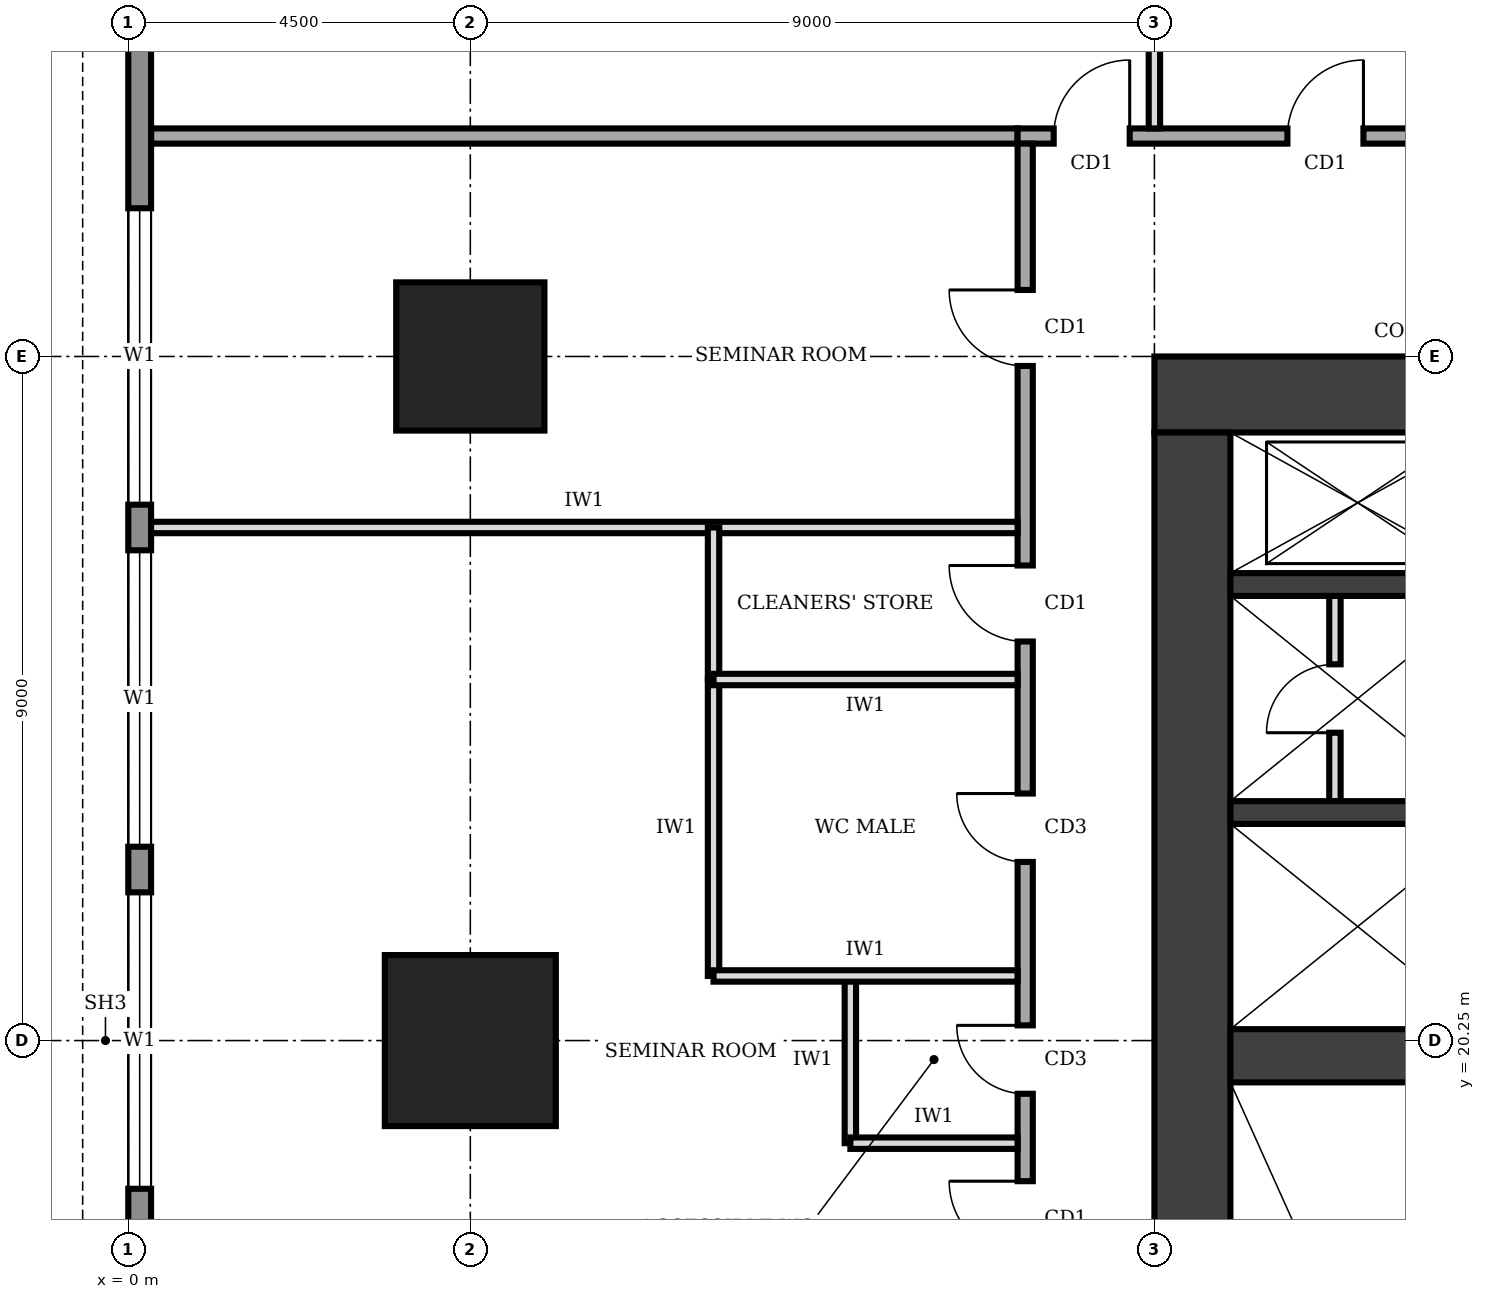
"""IFC4 building model, lengths in metres.
Left out: names, types, materials, properties, quantities, classifications, styles, units other than length and angle.
Written with IfcOpenShell. Run it as: python <this file> out.ifc"""

import sys

from ifc_helpers import new_model, si_unit, direction, frame, frame_2d, origin, origin_2d, place, context, subcontext, project, spatial, rectangle, extrude, element, fill, save


model = new_model("IFC4")
c1 = context("Model", 3, precision=1e-05, world=origin(), true_north=direction((0.0, 1.0)))
c2 = subcontext(c1, "Body", "Model", "MODEL_VIEW")
j1 = project(units=[si_unit("LENGTHUNIT", "METRE"), si_unit("PLANEANGLEUNIT", "RADIAN")], contexts=[c1])
p1 = place(None, origin())
s1 = spatial("IfcSite", under=j1, at=p1, CompositionType="ELEMENT")
p2 = place(p1, origin())
s2 = spatial("IfcBuilding", under=s1, at=p2, CompositionType="ELEMENT")
p3 = place(p2, frame((0.0, 0.0, 221.0)))
s3 = spatial("IfcBuildingStorey", under=s2, at=p3, CompositionType="ELEMENT", Elevation=221.0)
p4 = place(p3, frame((27.0, 28.75, 0.0), z_axis=(0.0, 0.0, 1.0), x_axis=(-1.0, 0.0, 0.0)))
e1 = element("IfcWall", 1, at=p4, inside=s3, PredefinedType="SHEAR", context=c2, shape_type="SweptSolid", body=[
    extrude(rectangle(XDim=13.5, YDim=1.0, at=frame_2d((6.75, 0.0))), origin(), (0.0, 0.0, 1.0), 4.0),
])
p5 = place(p4, frame((4.75, 0.0, 0.0)))
e2 = element("IfcOpeningElement", 2, at=p5, cuts=e1, PredefinedType="OPENING", context=c2, shape_type="SweptSolid", body=[
    extrude(rectangle(XDim=1.8, YDim=2.1, at=frame_2d((0.9, 1.05))), frame((0.0, 0.51, 0.0), z_axis=(0.0, -1.0, 0.0), x_axis=(1.0, 0.0, 0.0)), (0.0, 0.0, 1.0), 1.02),
])
p6 = place(p3, frame((14.0, 28.25, 0.0), z_axis=(0.0, 0.0, 1.0), x_axis=(0.0, -1.0, 0.0)))
e3 = element("IfcWall", 3, at=p6, inside=s3, PredefinedType="SHEAR", context=c2, shape_type="SweptSolid", body=[
    extrude(rectangle(XDim=16.0, YDim=1.0, at=frame_2d((8.0, 0.0))), origin(), (0.0, 0.0, 1.0), 4.0),
])
p7 = place(p3, frame((14.5, 20.05, 0.0), z_axis=(0.0, 0.0, 1.0), x_axis=(1.0, 0.0, 0.0)))
e4 = element("IfcWall", 4, at=p7, inside=s3, PredefinedType="SHEAR", context=c2, shape_type="SweptSolid", body=[
    extrude(rectangle(XDim=3.35, YDim=0.7, at=frame_2d((1.675, 0.0))), origin(), (0.0, 0.0, 1.0), 4.0),
])
for number, where, z_axis, x_axis in (
    (5, (14.5, 23.25, 0.0), (0.0, 0.0, 1.0), (1.0, 0.0, 0.0)),
    (6, (14.5, 26.25, 0.0), (0.0, 0.0, 1.0), (1.0, 0.0, 0.0)),
):
    element("IfcWall", number, at=place(p3, frame(where, z_axis=z_axis, x_axis=x_axis)), inside=s3, PredefinedType="SHEAR", context=c2, shape_type="SweptSolid", body=[
        extrude(rectangle(XDim=3.35, YDim=0.3, at=frame_2d((1.675, 0.0))), origin(), (0.0, 0.0, 1.0), 4.0),
    ])
p8 = place(p3, frame((4.5, 20.25, 0.0), z_axis=(0.0, 0.0, 1.0), x_axis=(1.0, 0.0, 0.0)))
e7 = element("IfcColumn", 7, at=p8, inside=s3, PredefinedType="COLUMN", context=c2, shape_type="SweptSolid", body=[
    extrude(rectangle(XDim=2.25, YDim=2.25, at=origin_2d()), origin(), (0.0, 0.0, 1.0), 4.0),
])
p9 = place(p3, frame((4.5, 29.25, 0.0), z_axis=(0.0, 0.0, 1.0), x_axis=(1.0, 0.0, 0.0)))
e8 = element("IfcColumn", 8, at=p9, inside=s3, PredefinedType="COLUMN", context=c2, shape_type="SweptSolid", body=[
    extrude(rectangle(XDim=1.95, YDim=1.95, at=origin_2d()), origin(), (0.0, 0.0, 1.0), 4.0),
])
p10 = place(p3, frame((0.15, 35.98, 0.0), z_axis=(0.0, 0.0, 1.0), x_axis=(0.0, -1.0, 0.0)))
e9 = element("IfcWall", 9, at=p10, inside=s3, PredefinedType="STANDARD", context=c2, shape_type="SweptSolid", body=[
    extrude(rectangle(XDim=31.46, YDim=0.3, at=frame_2d((15.73, 0.0))), origin(), (0.0, 0.0, 1.0), 3.75),
])
p11 = place(p10, frame((27.28, 0.0, 0.9)))
e10 = element("IfcOpeningElement", 10, at=p11, cuts=e9, PredefinedType="OPENING", context=c2, shape_type="SweptSolid", body=[
    extrude(rectangle(XDim=3.9, YDim=2.2, at=frame_2d((1.95, 1.1))), frame((0.0, 0.16, 0.0), z_axis=(0.0, -1.0, 0.0), x_axis=(1.0, 0.0, 0.0)), (0.0, 0.0, 1.0), 0.32),
])
p12 = place(p10, frame((22.78, 0.0, 0.9)))
e11 = element("IfcOpeningElement", 11, at=p12, cuts=e9, PredefinedType="OPENING", context=c2, shape_type="SweptSolid", body=[
    extrude(rectangle(XDim=3.9, YDim=2.2, at=frame_2d((1.95, 1.1))), frame((0.0, 0.16, 0.0), z_axis=(0.0, -1.0, 0.0), x_axis=(1.0, 0.0, 0.0)), (0.0, 0.0, 1.0), 0.32),
])
p13 = place(p10, frame((18.28, 0.0, 0.9)))
e12 = element("IfcOpeningElement", 12, at=p13, cuts=e9, PredefinedType="OPENING", context=c2, shape_type="SweptSolid", body=[
    extrude(rectangle(XDim=3.9, YDim=2.2, at=frame_2d((1.95, 1.1))), frame((0.0, 0.16, 0.0), z_axis=(0.0, -1.0, 0.0), x_axis=(1.0, 0.0, 0.0)), (0.0, 0.0, 1.0), 0.32),
])
p14 = place(p10, frame((13.78, 0.0, 0.9)))
e13 = element("IfcOpeningElement", 13, at=p14, cuts=e9, PredefinedType="OPENING", context=c2, shape_type="SweptSolid", body=[
    extrude(rectangle(XDim=3.9, YDim=2.2, at=frame_2d((1.95, 1.1))), frame((0.0, 0.16, 0.0), z_axis=(0.0, -1.0, 0.0), x_axis=(1.0, 0.0, 0.0)), (0.0, 0.0, 1.0), 0.32),
])
p15 = place(p10, frame((9.28, 0.0, 0.9)))
e14 = element("IfcOpeningElement", 14, at=p15, cuts=e9, PredefinedType="OPENING", context=c2, shape_type="SweptSolid", body=[
    extrude(rectangle(XDim=3.9, YDim=2.2, at=frame_2d((1.95, 1.1))), frame((0.0, 0.16, 0.0), z_axis=(0.0, -1.0, 0.0), x_axis=(1.0, 0.0, 0.0)), (0.0, 0.0, 1.0), 0.32),
])
p16 = place(p10, frame((4.78, 0.0, 0.9)))
e15 = element("IfcOpeningElement", 15, at=p16, cuts=e9, PredefinedType="OPENING", context=c2, shape_type="SweptSolid", body=[
    extrude(rectangle(XDim=3.9, YDim=2.2, at=frame_2d((1.95, 1.1))), frame((0.0, 0.16, 0.0), z_axis=(0.0, -1.0, 0.0), x_axis=(1.0, 0.0, 0.0)), (0.0, 0.0, 1.0), 0.32),
])
p17 = place(p3, frame((15.875, 23.4, 0.0), z_axis=(0.0, 0.0, 1.0), x_axis=(0.0, 1.0, 0.0)))
e16 = element("IfcWall", 16, at=p17, inside=s3, PredefinedType="PARTITIONING", context=c2, shape_type="SweptSolid", body=[
    extrude(rectangle(XDim=2.7, YDim=0.15, at=frame_2d((1.35, 0.0))), origin(), (0.0, 0.0, 1.0), 3.75),
])
p18 = place(p17, frame((0.9, 0.0, 0.0)))
e17 = element("IfcOpeningElement", 17, at=p18, cuts=e16, PredefinedType="OPENING", context=c2, shape_type="SweptSolid", body=[
    extrude(rectangle(XDim=0.9, YDim=2.1, at=frame_2d((0.45, 1.05))), frame((0.0, 0.085, 0.0), z_axis=(0.0, -1.0, 0.0), x_axis=(1.0, 0.0, 0.0)), (0.0, 0.0, 1.0), 0.17),
])
p19 = place(p3, frame((28.6, 32.15, 0.0), z_axis=(0.0, 0.0, 1.0), x_axis=(-1.0, 0.0, 0.0)))
e18 = element("IfcWall", 18, at=p19, inside=s3, PredefinedType="SOLIDWALL", context=c2, shape_type="SweptSolid", body=[
    extrude(rectangle(XDim=16.9, YDim=0.2, at=frame_2d((8.45, 0.0))), origin(), (0.0, 0.0, 1.0), 3.75),
])
p20 = place(p19, frame((15.425, 0.0, 0.0)))
e19 = element("IfcOpeningElement", 19, at=p20, cuts=e18, PredefinedType="OPENING", context=c2, shape_type="SweptSolid", body=[
    extrude(rectangle(XDim=1.0, YDim=2.1, at=frame_2d((0.5, 1.05))), frame((0.0, 0.11, 0.0), z_axis=(0.0, -1.0, 0.0), x_axis=(1.0, 0.0, 0.0)), (0.0, 0.0, 1.0), 0.22),
])
p21 = place(p19, frame((12.35, 0.0, 0.0)))
e20 = element("IfcOpeningElement", 20, at=p21, cuts=e18, PredefinedType="OPENING", context=c2, shape_type="SweptSolid", body=[
    extrude(rectangle(XDim=1.0, YDim=2.1, at=frame_2d((0.5, 1.05))), frame((0.0, 0.11, 0.0), z_axis=(0.0, -1.0, 0.0), x_axis=(1.0, 0.0, 0.0)), (0.0, 0.0, 1.0), 0.22),
])
p22 = place(p19, frame((5.6, 0.0, 0.0)))
e21 = element("IfcOpeningElement", 21, at=p22, cuts=e18, PredefinedType="OPENING", context=c2, shape_type="SweptSolid", body=[
    extrude(rectangle(XDim=1.0, YDim=2.1, at=frame_2d((0.5, 1.05))), frame((0.0, 0.11, 0.0), z_axis=(0.0, -1.0, 0.0), x_axis=(1.0, 0.0, 0.0)), (0.0, 0.0, 1.0), 0.22),
])
p23 = place(p19, frame((0.275, 0.0, 0.0)))
e22 = element("IfcOpeningElement", 22, at=p23, cuts=e18, PredefinedType="OPENING", context=c2, shape_type="SweptSolid", body=[
    extrude(rectangle(XDim=1.0, YDim=2.1, at=frame_2d((0.5, 1.05))), frame((0.0, 0.11, 0.0), z_axis=(0.0, -1.0, 0.0), x_axis=(1.0, 0.0, 0.0)), (0.0, 0.0, 1.0), 0.22),
])
p24 = place(p3, frame((11.8, 32.05, 0.0), z_axis=(0.0, 0.0, 1.0), x_axis=(0.0, -1.0, 0.0)))
e23 = element("IfcWall", 23, at=p24, inside=s3, PredefinedType="SOLIDWALL", context=c2, shape_type="SweptSolid", body=[
    extrude(rectangle(XDim=23.8, YDim=0.2, at=frame_2d((11.9, 0.0))), origin(), (0.0, 0.0, 1.0), 3.75),
])
p25 = place(p24, frame((20.675, 0.0, 0.0)))
e24 = element("IfcOpeningElement", 24, at=p25, cuts=e23, PredefinedType="OPENING", context=c2, shape_type="SweptSolid", body=[
    extrude(rectangle(XDim=1.0, YDim=2.1, at=frame_2d((0.5, 1.05))), frame((0.0, 0.11, 0.0), z_axis=(0.0, -1.0, 0.0), x_axis=(1.0, 0.0, 0.0)), (0.0, 0.0, 1.0), 0.22),
])
p26 = place(p24, frame((16.4, 0.0, 0.0)))
e25 = element("IfcOpeningElement", 25, at=p26, cuts=e23, PredefinedType="OPENING", context=c2, shape_type="SweptSolid", body=[
    extrude(rectangle(XDim=0.9, YDim=2.1, at=frame_2d((0.45, 1.05))), frame((0.0, 0.11, 0.0), z_axis=(0.0, -1.0, 0.0), x_axis=(1.0, 0.0, 0.0)), (0.0, 0.0, 1.0), 0.22),
])
p27 = place(p24, frame((11.6, 0.0, 0.0)))
e26 = element("IfcOpeningElement", 26, at=p27, cuts=e23, PredefinedType="OPENING", context=c2, shape_type="SweptSolid", body=[
    extrude(rectangle(XDim=0.9, YDim=2.1, at=frame_2d((0.45, 1.05))), frame((0.0, 0.11, 0.0), z_axis=(0.0, -1.0, 0.0), x_axis=(1.0, 0.0, 0.0)), (0.0, 0.0, 1.0), 0.22),
])
p28 = place(p24, frame((8.55, 0.0, 0.0)))
e27 = element("IfcOpeningElement", 27, at=p28, cuts=e23, PredefinedType="OPENING", context=c2, shape_type="SweptSolid", body=[
    extrude(rectangle(XDim=0.9, YDim=2.1, at=frame_2d((0.45, 1.05))), frame((0.0, 0.11, 0.0), z_axis=(0.0, -1.0, 0.0), x_axis=(1.0, 0.0, 0.0)), (0.0, 0.0, 1.0), 0.22),
])
p29 = place(p24, frame((5.55, 0.0, 0.0)))
e28 = element("IfcOpeningElement", 28, at=p29, cuts=e23, PredefinedType="OPENING", context=c2, shape_type="SweptSolid", body=[
    extrude(rectangle(XDim=1.0, YDim=2.1, at=frame_2d((0.5, 1.05))), frame((0.0, 0.11, 0.0), z_axis=(0.0, -1.0, 0.0), x_axis=(1.0, 0.0, 0.0)), (0.0, 0.0, 1.0), 0.22),
])
p30 = place(p24, frame((13.65, 0.0, 0.0)))
e29 = element("IfcOpeningElement", 29, at=p30, cuts=e23, PredefinedType="OPENING", context=c2, shape_type="SweptSolid", body=[
    extrude(rectangle(XDim=1.0, YDim=2.1, at=frame_2d((0.5, 1.05))), frame((0.0, 0.11, 0.0), z_axis=(0.0, -1.0, 0.0), x_axis=(1.0, 0.0, 0.0)), (0.0, 0.0, 1.0), 0.22),
])
p31 = place(p24, frame((1.925, 0.0, 0.0)))
e30 = element("IfcOpeningElement", 30, at=p31, cuts=e23, PredefinedType="OPENING", context=c2, shape_type="SweptSolid", body=[
    extrude(rectangle(XDim=1.0, YDim=2.1, at=frame_2d((0.5, 1.05))), frame((0.0, 0.11, 0.0), z_axis=(0.0, -1.0, 0.0), x_axis=(1.0, 0.0, 0.0)), (0.0, 0.0, 1.0), 0.22),
])
p32 = place(p3, frame((0.3, 32.15, 0.0), z_axis=(0.0, 0.0, 1.0), x_axis=(1.0, 0.0, 0.0)))
e31 = element("IfcWall", 31, at=p32, inside=s3, PredefinedType="SOLIDWALL", context=c2, shape_type="SweptSolid", body=[
    extrude(rectangle(XDim=11.4, YDim=0.2, at=frame_2d((5.7, 0.0))), origin(), (0.0, 0.0, 1.0), 3.75),
])
p33 = place(p3, frame((13.5, 32.25, 0.0), z_axis=(0.0, 0.0, 1.0), x_axis=(0.0, 1.0, 0.0)))
e32 = element("IfcWall", 32, at=p33, inside=s3, PredefinedType="PARTITIONING", context=c2, shape_type="SweptSolid", body=[
    extrude(rectangle(XDim=2.955, YDim=0.15, at=frame_2d((1.478, 0.0))), origin(), (0.0, 0.0, 1.0), 2.85),
])
p34 = place(p3, frame((0.3, 27.0, 0.0), z_axis=(0.0, 0.0, 1.0), x_axis=(1.0, 0.0, 0.0)))
e33 = element("IfcWall", 33, at=p34, inside=s3, PredefinedType="PARTITIONING", context=c2, shape_type="SweptSolid", body=[
    extrude(rectangle(XDim=11.4, YDim=0.15, at=frame_2d((5.7, 0.0))), origin(), (0.0, 0.0, 1.0), 3.75),
])
p35 = place(p3, frame((11.7, 18.9, 0.0), z_axis=(0.0, 0.0, 1.0), x_axis=(-1.0, 0.0, 0.0)))
e34 = element("IfcWall", 34, at=p35, inside=s3, PredefinedType="PARTITIONING", context=c2, shape_type="SweptSolid", body=[
    extrude(rectangle(XDim=2.2, YDim=0.15, at=frame_2d((1.1, 0.0))), origin(), (0.0, 0.0, 1.0), 3.75),
])
p36 = place(p3, frame((11.7, 21.1, 0.0), z_axis=(0.0, 0.0, 1.0), x_axis=(-1.0, 0.0, 0.0)))
e35 = element("IfcWall", 35, at=p36, inside=s3, PredefinedType="PARTITIONING", context=c2, shape_type="SweptSolid", body=[
    extrude(rectangle(XDim=4.0, YDim=0.15, at=frame_2d((2.0, 0.0))), origin(), (0.0, 0.0, 1.0), 2.85),
])
p37 = place(p3, frame((11.7, 25.0, 0.0), z_axis=(0.0, 0.0, 1.0), x_axis=(-1.0, 0.0, 0.0)))
e36 = element("IfcWall", 36, at=p37, inside=s3, PredefinedType="PARTITIONING", context=c2, shape_type="SweptSolid", body=[
    extrude(rectangle(XDim=4.0, YDim=0.15, at=frame_2d((2.0, 0.0))), origin(), (0.0, 0.0, 1.0), 3.75),
])
p38 = place(p3, frame((9.5, 18.9, 0.0), z_axis=(0.0, 0.0, 1.0), x_axis=(0.0, 1.0, 0.0)))
e37 = element("IfcWall", 37, at=p38, inside=s3, PredefinedType="PARTITIONING", context=c2, shape_type="SweptSolid", body=[
    extrude(rectangle(XDim=2.2, YDim=0.15, at=frame_2d((1.1, 0.0))), origin(), (0.0, 0.0, 1.0), 3.75),
])
p39 = place(p3, frame((7.7, 21.1, 0.0), z_axis=(0.0, 0.0, 1.0), x_axis=(0.0, 1.0, 0.0)))
e38 = element("IfcWall", 38, at=p39, inside=s3, PredefinedType="PARTITIONING", context=c2, shape_type="SweptSolid", body=[
    extrude(rectangle(XDim=3.9, YDim=0.15, at=frame_2d((1.95, 0.0))), origin(), (0.0, 0.0, 1.0), 3.75),
])
p40 = place(p3, frame((7.7, 25.0, 0.0), z_axis=(0.0, 0.0, 1.0), x_axis=(0.0, 1.0, 0.0)))
e39 = element("IfcWall", 39, at=p40, inside=s3, PredefinedType="PARTITIONING", context=c2, shape_type="SweptSolid", body=[
    extrude(rectangle(XDim=2.0, YDim=0.15, at=frame_2d((1.0, 0.0))), origin(), (0.0, 0.0, 1.0), 3.75),
])
p41 = place(p14, origin())
e40 = element("IfcWindow", 40, at=p41, inside=s3, PartitioningType="SINGLE_PANEL", PredefinedType="WINDOW", context=c2, shape_type="SweptSolid", body=[
    extrude(rectangle(XDim=3.9, YDim=2.2, at=frame_2d((1.95, 1.1))), frame((0.0, 0.03, 0.0), z_axis=(0.0, -1.0, 0.0), x_axis=(1.0, 0.0, 0.0)), (0.0, 0.0, 1.0), 0.06),
])
fill(e13, e40)
p42 = place(p15, origin())
e41 = element("IfcWindow", 41, at=p42, inside=s3, PartitioningType="SINGLE_PANEL", PredefinedType="WINDOW", context=c2, shape_type="SweptSolid", body=[
    extrude(rectangle(XDim=3.9, YDim=2.2, at=frame_2d((1.95, 1.1))), frame((0.0, 0.03, 0.0), z_axis=(0.0, -1.0, 0.0), x_axis=(1.0, 0.0, 0.0)), (0.0, 0.0, 1.0), 0.06),
])
fill(e14, e41)
p43 = place(p16, origin())
e42 = element("IfcWindow", 42, at=p43, inside=s3, PartitioningType="SINGLE_PANEL", PredefinedType="WINDOW", context=c2, shape_type="SweptSolid", body=[
    extrude(rectangle(XDim=3.9, YDim=2.2, at=frame_2d((1.95, 1.1))), frame((0.0, 0.03, 0.0), z_axis=(0.0, -1.0, 0.0), x_axis=(1.0, 0.0, 0.0)), (0.0, 0.0, 1.0), 0.06),
])
fill(e15, e42)
p44 = place(p18, origin())
e43 = element("IfcDoor", 43, at=p44, inside=s3, OperationType="SINGLE_SWING_LEFT", PredefinedType="DOOR", context=c2, shape_type="SweptSolid", body=[
    extrude(rectangle(XDim=0.9, YDim=2.1, at=frame_2d((0.45, 1.05))), frame((0.0, 0.025, 0.0), z_axis=(0.0, -1.0, 0.0), x_axis=(1.0, 0.0, 0.0)), (0.0, 0.0, 1.0), 0.05),
])
fill(e17, e43)
p45 = place(p20, frame((1.0, 0.0, 0.0), z_axis=(0.0, 0.0, 1.0), x_axis=(-1.0, 0.0, 0.0)))
e44 = element("IfcDoor", 44, at=p45, inside=s3, OperationType="SINGLE_SWING_RIGHT", PredefinedType="DOOR", context=c2, shape_type="SweptSolid", body=[
    extrude(rectangle(XDim=1.0, YDim=2.1, at=frame_2d((0.5, 1.05))), frame((0.0, 0.025, 0.0), z_axis=(0.0, -1.0, 0.0), x_axis=(1.0, 0.0, 0.0)), (0.0, 0.0, 1.0), 0.05),
])
fill(e19, e44)
p46 = place(p21, frame((1.0, 0.0, 0.0), z_axis=(0.0, 0.0, 1.0), x_axis=(-1.0, 0.0, 0.0)))
e45 = element("IfcDoor", 45, at=p46, inside=s3, OperationType="SINGLE_SWING_RIGHT", PredefinedType="DOOR", context=c2, shape_type="SweptSolid", body=[
    extrude(rectangle(XDim=1.0, YDim=2.1, at=frame_2d((0.5, 1.05))), frame((0.0, 0.025, 0.0), z_axis=(0.0, -1.0, 0.0), x_axis=(1.0, 0.0, 0.0)), (0.0, 0.0, 1.0), 0.05),
])
fill(e20, e45)
p47 = place(p27, frame((0.9, 0.0, 0.0), z_axis=(0.0, 0.0, 1.0), x_axis=(-1.0, 0.0, 0.0)))
e46 = element("IfcDoor", 46, at=p47, inside=s3, OperationType="SINGLE_SWING_RIGHT", PredefinedType="DOOR", context=c2, shape_type="SweptSolid", body=[
    extrude(rectangle(XDim=0.9, YDim=2.1, at=frame_2d((0.45, 1.05))), frame((0.0, 0.025, 0.0), z_axis=(0.0, -1.0, 0.0), x_axis=(1.0, 0.0, 0.0)), (0.0, 0.0, 1.0), 0.05),
])
fill(e26, e46)
p48 = place(p28, frame((0.9, 0.0, 0.0), z_axis=(0.0, 0.0, 1.0), x_axis=(-1.0, 0.0, 0.0)))
e47 = element("IfcDoor", 47, at=p48, inside=s3, OperationType="SINGLE_SWING_RIGHT", PredefinedType="DOOR", context=c2, shape_type="SweptSolid", body=[
    extrude(rectangle(XDim=0.9, YDim=2.1, at=frame_2d((0.45, 1.05))), frame((0.0, 0.025, 0.0), z_axis=(0.0, -1.0, 0.0), x_axis=(1.0, 0.0, 0.0)), (0.0, 0.0, 1.0), 0.05),
])
fill(e27, e47)
p49 = place(p29, frame((1.0, 0.0, 0.0), z_axis=(0.0, 0.0, 1.0), x_axis=(-1.0, 0.0, 0.0)))
e48 = element("IfcDoor", 48, at=p49, inside=s3, OperationType="SINGLE_SWING_RIGHT", PredefinedType="DOOR", context=c2, shape_type="SweptSolid", body=[
    extrude(rectangle(XDim=1.0, YDim=2.1, at=frame_2d((0.5, 1.05))), frame((0.0, 0.025, 0.0), z_axis=(0.0, -1.0, 0.0), x_axis=(1.0, 0.0, 0.0)), (0.0, 0.0, 1.0), 0.05),
])
fill(e28, e48)
p50 = place(p30, frame((1.0, 0.0, 0.0), z_axis=(0.0, 0.0, 1.0), x_axis=(-1.0, 0.0, 0.0)))
e49 = element("IfcDoor", 49, at=p50, inside=s3, OperationType="SINGLE_SWING_RIGHT", PredefinedType="DOOR", context=c2, shape_type="SweptSolid", body=[
    extrude(rectangle(XDim=1.0, YDim=2.1, at=frame_2d((0.5, 1.05))), frame((0.0, 0.025, 0.0), z_axis=(0.0, -1.0, 0.0), x_axis=(1.0, 0.0, 0.0)), (0.0, 0.0, 1.0), 0.05),
])
fill(e29, e49)
p51 = place(p31, frame((1.0, 0.0, 0.0), z_axis=(0.0, 0.0, 1.0), x_axis=(-1.0, 0.0, 0.0)))
e50 = element("IfcDoor", 50, at=p51, inside=s3, OperationType="SINGLE_SWING_RIGHT", PredefinedType="DOOR", context=c2, shape_type="SweptSolid", body=[
    extrude(rectangle(XDim=1.0, YDim=2.1, at=frame_2d((0.5, 1.05))), frame((0.0, 0.025, 0.0), z_axis=(0.0, -1.0, 0.0), x_axis=(1.0, 0.0, 0.0)), (0.0, 0.0, 1.0), 0.05),
])
fill(e30, e50)
save(model, sys.argv[1])
